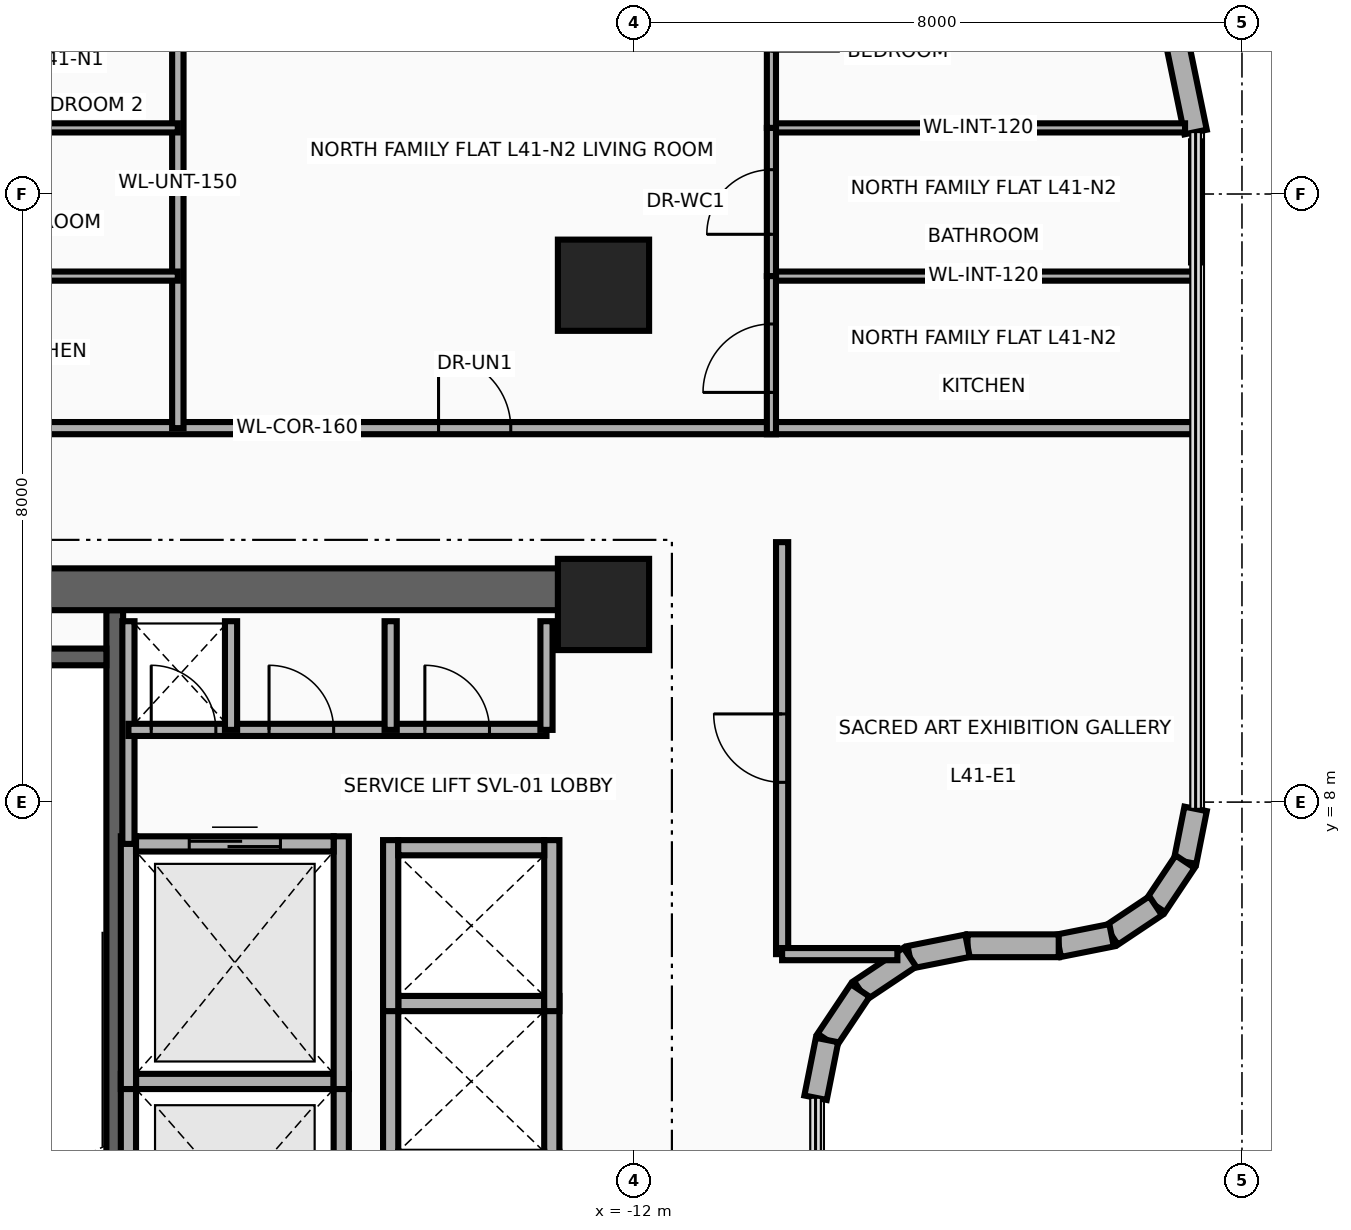
"""IFC4 building model, lengths in metres.
Left out: names, types, materials, properties, quantities, classifications, styles, units other than length and angle.
Written with IfcOpenShell. Run it as: python <this file> out.ifc"""

import sys

from ifc_helpers import new_model, si_unit, direction, frame, frame_2d, origin, origin_2d, place, context, subcontext, project, spatial, rectangle, extrude, source, transform, mapped, element, fill, save


model = new_model("IFC4")
c1 = context("Model", 3, precision=1e-05, world=origin(), true_north=direction((0.0, 1.0)))
c2 = subcontext(c1, "Body", "Model", "MODEL_VIEW")
j1 = project(units=[si_unit("LENGTHUNIT", "METRE"), si_unit("PLANEANGLEUNIT", "RADIAN")], contexts=[c1])
p1 = place(None, origin())
s1 = spatial("IfcSite", under=j1, at=p1, CompositionType="ELEMENT")
p2 = place(p1, origin())
s2 = spatial("IfcBuilding", under=s1, at=p2, CompositionType="ELEMENT")
p3 = place(p2, frame((0.0, 0.0, 161.2)))
s3 = spatial("IfcBuildingStorey", under=s2, at=p3, CompositionType="ELEMENT", Elevation=161.2)
p4 = place(p3, frame((-18.83, 1.78, 0.0), z_axis=(0.0, 0.0, 1.0), x_axis=(0.0, 1.0, 0.0)))
e1 = element("IfcWall", 1, at=p4, inside=s3, PredefinedType="SHEAR", context=c2, shape_type="SweptSolid", body=[
    extrude(rectangle(XDim=8.745, YDim=0.22, at=frame_2d((4.373, 0.0))), origin(), (0.0, 0.0, 1.0), 3.46),
])
p5 = place(p3, frame((-22.05, 9.91, 0.0), z_axis=(0.0, 0.0, 1.0), x_axis=(1.0, 0.0, 0.0)))
e2 = element("IfcWall", 2, at=p5, inside=s3, PredefinedType="SHEAR", context=c2, shape_type="SweptSolid", body=[
    extrude(rectangle(XDim=3.11, YDim=0.22, at=frame_2d((1.555, 0.0))), origin(), (0.0, 0.0, 1.0), 3.46),
])
p6 = place(p3, frame((-22.65, 10.8, 0.0), z_axis=(0.0, 0.0, 1.0), x_axis=(1.0, 0.0, 0.0)))
e3 = element("IfcWall", 3, at=p6, inside=s3, PredefinedType="SHEAR", context=c2, shape_type="SweptSolid", body=[
    extrude(rectangle(XDim=10.25, YDim=0.55, at=frame_2d((5.125, 0.0))), origin(), (0.0, 0.0, 1.0), 3.46),
])
m1 = source(origin(), c2, "Body", "SweptSolid", [
    extrude(rectangle(XDim=1.2, YDim=1.2, at=origin_2d()), origin(), (0.0, 0.0, 1.0), 3.7),
])
for number, where, z_axis, x_axis in (
    (4, (-12.4, 10.6, 0.0), (0.0, 0.0, 1.0), (1.0, 0.0, 0.0)),
    (5, (-12.4, 14.8, 0.0), (0.0, 0.0, 1.0), (1.0, 0.0, 0.0)),
):
    element("IfcColumn", number, at=place(p3, frame(where, z_axis=z_axis, x_axis=x_axis)), inside=s3, PredefinedType="COLUMN", context=c2, shape_type="MappedRepresentation", body=[
        mapped(m1, transform((0.0, 0.0, 0.0), x_axis=(1.0, 0.0, 0.0), y_axis=(0.0, 1.0, 0.0), z_axis=(0.0, 0.0, 1.0), scale=1.0)),
    ])
p7 = place(p3, frame((-4.863, 18.046, 0.0), z_axis=(0.0, 0.0, 1.0), x_axis=(0.201532282172, -0.97948187285, 0.0)))
e6 = element("IfcWall", 6, at=p7, inside=s3, PredefinedType="SOLIDWALL", context=c2, shape_type="SweptSolid", body=[
    extrude(rectangle(XDim=1.256, YDim=0.3, at=frame_2d((0.628, 0.0))), origin(), (0.0, 0.0, 1.0), 3.46),
])
p8 = place(p3, frame((-4.61, 7.911, 0.0), z_axis=(0.0, 0.0, 1.0), x_axis=(-0.194989739953, -0.980805282058, 0.0)))
e7 = element("IfcWall", 7, at=p8, inside=s3, PredefinedType="SOLIDWALL", context=c2, shape_type="SweptSolid", body=[
    extrude(rectangle(XDim=0.709, YDim=0.3, at=frame_2d((0.354, 0.0))), origin(), (0.0, 0.0, 1.0), 3.46),
])
for number, where, z_axis, x_axis in (
    (8, (-4.748, 7.216, 0.0), (0.0, 0.0, 1.0), (-0.555, -0.832, 0.0)),
    (9, (-5.136, 6.636, 0.0), (0.0, 0.0, 1.0), (-0.832, -0.555, 0.0)),
):
    element("IfcWall", number, at=place(p3, frame(where, z_axis=z_axis, x_axis=x_axis)), inside=s3, PredefinedType="SOLIDWALL", context=c2, shape_type="SweptSolid", body=[
        extrude(rectangle(XDim=0.698, YDim=0.3, at=frame_2d((0.349, 0.0))), origin(), (0.0, 0.0, 1.0), 3.46),
    ])
p9 = place(p3, frame((-5.716, 6.248, 0.0), z_axis=(0.0, 0.0, 1.0), x_axis=(-0.980805282058, -0.194989739953, 0.0)))
e10 = element("IfcWall", 10, at=p9, inside=s3, PredefinedType="SOLIDWALL", context=c2, shape_type="SweptSolid", body=[
    extrude(rectangle(XDim=0.709, YDim=0.3, at=frame_2d((0.354, 0.0))), origin(), (0.0, 0.0, 1.0), 3.46),
])
p10 = place(p3, frame((-6.411, 6.11, 0.0), z_axis=(0.0, 0.0, 1.0), x_axis=(-1.0, 0.0, 0.0)))
e11 = element("IfcWall", 11, at=p10, inside=s3, PredefinedType="SOLIDWALL", context=c2, shape_type="SweptSolid", body=[
    extrude(rectangle(XDim=1.2, YDim=0.3, at=frame_2d((0.6, 0.0))), origin(), (0.0, 0.0, 1.0), 3.46),
])
p11 = place(p3, frame((-7.611, 6.11, 0.0), z_axis=(0.0, 0.0, 1.0), x_axis=(-0.98076219082, -0.195206365311, 0.0)))
e12 = element("IfcWall", 12, at=p11, inside=s3, PredefinedType="SOLIDWALL", context=c2, shape_type="SweptSolid", body=[
    extrude(rectangle(XDim=0.774, YDim=0.3, at=frame_2d((0.387, 0.0))), origin(), (0.0, 0.0, 1.0), 3.46),
])
for number, where, z_axis, x_axis in (
    (13, (-8.37, 5.959, 0.0), (0.0, 0.0, 1.0), (-0.831, -0.556, 0.0)),
    (14, (-9.023, 5.523, 0.0), (0.0, 0.0, 1.0), (-0.556, -0.831, 0.0)),
):
    element("IfcWall", number, at=place(p3, frame(where, z_axis=z_axis, x_axis=x_axis)), inside=s3, PredefinedType="SOLIDWALL", context=c2, shape_type="SweptSolid", body=[
        extrude(rectangle(XDim=0.785, YDim=0.3, at=frame_2d((0.393, 0.0))), origin(), (0.0, 0.0, 1.0), 3.46),
    ])
p12 = place(p3, frame((-9.459, 4.87, 0.0), z_axis=(0.0, 0.0, 1.0), x_axis=(-0.195206365311, -0.98076219082, 0.0)))
e15 = element("IfcWall", 15, at=p12, inside=s3, PredefinedType="SOLIDWALL", context=c2, shape_type="SweptSolid", body=[
    extrude(rectangle(XDim=0.774, YDim=0.3, at=frame_2d((0.387, 0.0))), origin(), (0.0, 0.0, 1.0), 3.46),
])
for number, where, z_axis, x_axis in (
    (16, (-18.65, 1.2, 0.0), (0.0, 0.0, 1.0), (0.0, 1.0, 0.0)),
    (17, (-15.85, 1.2, 0.0), (0.0, 0.0, 1.0), (0.0, 1.0, 0.0)),
):
    element("IfcWall", number, at=place(p3, frame(where, z_axis=z_axis, x_axis=x_axis)), inside=s3, PredefinedType="MOVABLE", context=c2, shape_type="SweptSolid", body=[
        extrude(rectangle(XDim=3.225, YDim=0.2, at=frame_2d((1.613, 0.0))), origin(), (0.0, 0.0, 1.0), 3.46),
    ])
p13 = place(p3, frame((-18.55, 4.325, 0.0), z_axis=(0.0, 0.0, 1.0), x_axis=(1.0, 0.0, 0.0)))
e18 = element("IfcWall", 18, at=p13, inside=s3, PredefinedType="MOVABLE", context=c2, shape_type="SweptSolid", body=[
    extrude(rectangle(XDim=2.6, YDim=0.2, at=frame_2d((1.3, 0.0))), origin(), (0.0, 0.0, 1.0), 3.46),
])
for number, where, z_axis, x_axis in (
    (19, (-18.65, 4.225, 0.0), (0.0, 0.0, 1.0), (0.0, 1.0, 0.0)),
    (20, (-15.85, 4.225, 0.0), (0.0, 0.0, 1.0), (0.0, 1.0, 0.0)),
):
    element("IfcWall", number, at=place(p3, frame(where, z_axis=z_axis, x_axis=x_axis)), inside=s3, PredefinedType="MOVABLE", context=c2, shape_type="SweptSolid", body=[
        extrude(rectangle(XDim=3.325, YDim=0.2, at=frame_2d((1.663, 0.0))), origin(), (0.0, 0.0, 1.0), 3.46),
    ])
p14 = place(p3, frame((-18.55, 7.45, 0.0), z_axis=(0.0, 0.0, 1.0), x_axis=(1.0, 0.0, 0.0)))
e21 = element("IfcWall", 21, at=p14, inside=s3, PredefinedType="MOVABLE", context=c2, shape_type="SweptSolid", body=[
    extrude(rectangle(XDim=2.6, YDim=0.2, at=frame_2d((1.3, 0.0))), origin(), (0.0, 0.0, 1.0), 3.46),
])
p15 = place(p14, frame((0.7, 0.0, 0.0)))
e22 = element("IfcOpeningElement", 22, at=p15, cuts=e21, PredefinedType="OPENING", context=c2, shape_type="SweptSolid", body=[
    extrude(rectangle(XDim=1.2, YDim=2.1, at=frame_2d((0.6, 1.05))), frame((0.0, 0.115, 0.0), z_axis=(0.0, -1.0, 0.0), x_axis=(1.0, 0.0, 0.0)), (0.0, 0.0, 1.0), 0.23),
])
for number, where, z_axis, x_axis in (
    (23, (-15.2, 3.2, 0.0), (0.0, 0.0, 1.0), (0.0, 1.0, 0.0)),
    (24, (-13.08, 3.2, 0.0), (0.0, 0.0, 1.0), (0.0, 1.0, 0.0)),
):
    element("IfcWall", number, at=place(p3, frame(where, z_axis=z_axis, x_axis=x_axis)), inside=s3, PredefinedType="MOVABLE", context=c2, shape_type="SweptSolid", body=[
        extrude(rectangle(XDim=2.25, YDim=0.2, at=frame_2d((1.125, 0.0))), origin(), (0.0, 0.0, 1.0), 3.46),
    ])
p16 = place(p3, frame((-15.1, 5.35, 0.0), z_axis=(0.0, 0.0, 1.0), x_axis=(1.0, 0.0, 0.0)))
e25 = element("IfcWall", 25, at=p16, inside=s3, PredefinedType="MOVABLE", context=c2, shape_type="SweptSolid", body=[
    extrude(rectangle(XDim=1.92, YDim=0.2, at=frame_2d((0.96, 0.0))), origin(), (0.0, 0.0, 1.0), 3.46),
])
for number, where, z_axis, x_axis in (
    (26, (-15.2, 5.25, 0.0), (0.0, 0.0, 1.0), (0.0, 1.0, 0.0)),
    (27, (-13.08, 5.25, 0.0), (0.0, 0.0, 1.0), (0.0, 1.0, 0.0)),
):
    element("IfcWall", number, at=place(p3, frame(where, z_axis=z_axis, x_axis=x_axis)), inside=s3, PredefinedType="MOVABLE", context=c2, shape_type="SweptSolid", body=[
        extrude(rectangle(XDim=2.25, YDim=0.2, at=frame_2d((1.125, 0.0))), origin(), (0.0, 0.0, 1.0), 3.46),
    ])
p17 = place(p3, frame((-15.1, 7.4, 0.0), z_axis=(0.0, 0.0, 1.0), x_axis=(1.0, 0.0, 0.0)))
e28 = element("IfcWall", 28, at=p17, inside=s3, PredefinedType="MOVABLE", context=c2, shape_type="SweptSolid", body=[
    extrude(rectangle(XDim=1.92, YDim=0.2, at=frame_2d((0.96, 0.0))), origin(), (0.0, 0.0, 1.0), 3.46),
])
p18 = place(p3, frame((-18.65, 7.45, 0.0), z_axis=(0.0, 0.0, 1.0), x_axis=(0.0, 1.0, 0.0)))
e29 = element("IfcWall", 29, at=p18, inside=s3, PredefinedType="PARTITIONING", context=c2, shape_type="SweptSolid", body=[
    extrude(rectangle(XDim=2.93, YDim=0.16, at=frame_2d((1.465, 0.0))), origin(), (0.0, 0.0, 1.0), 3.46),
])
p19 = place(p3, frame((-18.65, 8.95, 0.0), z_axis=(0.0, 0.0, 1.0), x_axis=(1.0, 0.0, 0.0)))
e30 = element("IfcWall", 30, at=p19, inside=s3, PredefinedType="PARTITIONING", context=c2, shape_type="SweptSolid", body=[
    extrude(rectangle(XDim=5.5, YDim=0.16, at=frame_2d((2.75, 0.0))), origin(), (0.0, 0.0, 1.0), 3.46),
])
p20 = place(p19, frame((0.3, 0.0, 0.0)))
e31 = element("IfcOpeningElement", 31, at=p20, cuts=e30, PredefinedType="OPENING", context=c2, shape_type="SweptSolid", body=[
    extrude(rectangle(XDim=0.85, YDim=2.05, at=frame_2d((0.425, 1.025))), frame((0.0, 0.095, 0.0), z_axis=(0.0, -1.0, 0.0), x_axis=(1.0, 0.0, 0.0)), (0.0, 0.0, 1.0), 0.19),
])
p21 = place(p19, frame((1.85, 0.0, 0.0)))
e32 = element("IfcOpeningElement", 32, at=p21, cuts=e30, PredefinedType="OPENING", context=c2, shape_type="SweptSolid", body=[
    extrude(rectangle(XDim=0.85, YDim=2.05, at=frame_2d((0.425, 1.025))), frame((0.0, 0.095, 0.0), z_axis=(0.0, -1.0, 0.0), x_axis=(1.0, 0.0, 0.0)), (0.0, 0.0, 1.0), 0.19),
])
p22 = place(p19, frame((3.9, 0.0, 0.0)))
e33 = element("IfcOpeningElement", 33, at=p22, cuts=e30, PredefinedType="OPENING", context=c2, shape_type="SweptSolid", body=[
    extrude(rectangle(XDim=0.85, YDim=2.05, at=frame_2d((0.425, 1.025))), frame((0.0, 0.095, 0.0), z_axis=(0.0, -1.0, 0.0), x_axis=(1.0, 0.0, 0.0)), (0.0, 0.0, 1.0), 0.19),
])
for number, where, z_axis, x_axis in (
    (34, (-13.15, 8.95, 0.0), (0.0, 0.0, 1.0), (0.0, 1.0, 0.0)),
    (35, (-17.3, 8.95, 0.0), (0.0, 0.0, 1.0), (0.0, 1.0, 0.0)),
    (36, (-15.2, 8.95, 0.0), (0.0, 0.0, 1.0), (0.0, 1.0, 0.0)),
):
    element("IfcWall", number, at=place(p3, frame(where, z_axis=z_axis, x_axis=x_axis)), inside=s3, PredefinedType="PARTITIONING", context=c2, shape_type="SweptSolid", body=[
        extrude(rectangle(XDim=1.43, YDim=0.16, at=frame_2d((0.715, 0.0))), origin(), (0.0, 0.0, 1.0), 3.46),
    ])
p23 = place(p3, frame((-28.25, 12.92, 0.0), z_axis=(0.0, 0.0, 1.0), x_axis=(1.0, 0.0, 0.0)))
e37 = element("IfcWall", 37, at=p23, inside=s3, PredefinedType="PARTITIONING", context=c2, shape_type="SweptSolid", body=[
    extrude(rectangle(XDim=23.64, YDim=0.16, at=frame_2d((11.82, 0.0))), origin(), (0.0, 0.0, 1.0), 2.834),
])
p24 = place(p23, frame((1.107, 0.0, 0.0)))
e38 = element("IfcOpeningElement", 38, at=p24, cuts=e37, PredefinedType="OPENING", context=c2, shape_type="SweptSolid", body=[
    extrude(rectangle(XDim=0.95, YDim=2.15, at=frame_2d((0.475, 1.075))), frame((0.0, 0.095, 0.0), z_axis=(0.0, -1.0, 0.0), x_axis=(1.0, 0.0, 0.0)), (0.0, 0.0, 1.0), 0.19),
])
p25 = place(p23, frame((13.68, 0.0, 0.0)))
e39 = element("IfcOpeningElement", 39, at=p25, cuts=e37, PredefinedType="OPENING", context=c2, shape_type="SweptSolid", body=[
    extrude(rectangle(XDim=0.95, YDim=2.15, at=frame_2d((0.475, 1.075))), frame((0.0, 0.095, 0.0), z_axis=(0.0, -1.0, 0.0), x_axis=(1.0, 0.0, 0.0)), (0.0, 0.0, 1.0), 0.19),
])
p26 = place(p3, frame((-18.0, 12.92, 0.0), z_axis=(0.0, 0.0, 1.0), x_axis=(0.0, 1.0, 0.0)))
e40 = element("IfcWall", 40, at=p26, inside=s3, PredefinedType="PARTITIONING", context=c2, shape_type="SweptSolid", body=[
    extrude(rectangle(XDim=6.457, YDim=0.15, at=frame_2d((3.229, 0.0))), origin(), (0.0, 0.0, 1.0), 2.666),
])
p27 = place(p3, frame((-25.085, 14.92, 0.0), z_axis=(0.0, 0.0, 1.0), x_axis=(1.0, 0.0, 0.0)))
e41 = element("IfcWall", 41, at=p27, inside=s3, PredefinedType="PARTITIONING", context=c2, shape_type="SweptSolid", body=[
    extrude(rectangle(XDim=7.085, YDim=0.12, at=frame_2d((3.542, 0.0))), origin(), (0.0, 0.0, 1.0), 2.666),
])
p28 = place(p3, frame((-25.085, 16.87, 0.0), z_axis=(0.0, 0.0, 1.0), x_axis=(1.0, 0.0, 0.0)))
e42 = element("IfcWall", 42, at=p28, inside=s3, PredefinedType="PARTITIONING", context=c2, shape_type="SweptSolid", body=[
    extrude(rectangle(XDim=7.085, YDim=0.12, at=frame_2d((3.542, 0.0))), origin(), (0.0, 0.0, 1.0), 3.46),
])
p29 = place(p3, frame((-10.191, 14.92, 0.0), z_axis=(0.0, 0.0, 1.0), x_axis=(1.0, 0.0, 0.0)))
e43 = element("IfcWall", 43, at=p29, inside=s3, PredefinedType="PARTITIONING", context=c2, shape_type="SweptSolid", body=[
    extrude(rectangle(XDim=5.581, YDim=0.12, at=frame_2d((2.79, 0.0))), origin(), (0.0, 0.0, 1.0), 3.46),
])
p30 = place(p3, frame((-10.191, 16.87, 0.0), z_axis=(0.0, 0.0, 1.0), x_axis=(1.0, 0.0, 0.0)))
e44 = element("IfcWall", 44, at=p30, inside=s3, PredefinedType="PARTITIONING", context=c2, shape_type="SweptSolid", body=[
    extrude(rectangle(XDim=5.442, YDim=0.12, at=frame_2d((2.721, 0.0))), origin(), (0.0, 0.0, 1.0), 3.46),
])
p31 = place(p3, frame((-10.191, 14.92, 0.0), z_axis=(0.0, 0.0, 1.0), x_axis=(0.0, 1.0, 0.0)))
e45 = element("IfcWall", 45, at=p31, inside=s3, PredefinedType="PARTITIONING", context=c2, shape_type="SweptSolid", body=[
    extrude(rectangle(XDim=1.95, YDim=0.12, at=frame_2d((0.975, 0.0))), origin(), (0.0, 0.0, 1.0), 3.46),
])
p32 = place(p31, frame((0.55, 0.0, 0.0)))
e46 = element("IfcOpeningElement", 46, at=p32, cuts=e45, PredefinedType="OPENING", context=c2, shape_type="SweptSolid", body=[
    extrude(rectangle(XDim=0.85, YDim=2.1, at=frame_2d((0.425, 1.05))), frame((0.0, 0.075, 0.0), z_axis=(0.0, -1.0, 0.0), x_axis=(1.0, 0.0, 0.0)), (0.0, 0.0, 1.0), 0.15),
])
p33 = place(p3, frame((-10.191, 12.84, 0.0), z_axis=(0.0, 0.0, 1.0), x_axis=(0.0, 1.0, 0.0)))
e47 = element("IfcWall", 47, at=p33, inside=s3, PredefinedType="PARTITIONING", context=c2, shape_type="SweptSolid", body=[
    extrude(rectangle(XDim=2.08, YDim=0.12, at=frame_2d((1.04, 0.0))), origin(), (0.0, 0.0, 1.0), 3.46),
])
p34 = place(p33, frame((0.55, 0.0, 0.0)))
e48 = element("IfcOpeningElement", 48, at=p34, cuts=e47, PredefinedType="OPENING", context=c2, shape_type="SweptSolid", body=[
    extrude(rectangle(XDim=0.9, YDim=2.1, at=frame_2d((0.45, 1.05))), frame((0.0, 0.075, 0.0), z_axis=(0.0, -1.0, 0.0), x_axis=(1.0, 0.0, 0.0)), (0.0, 0.0, 1.0), 0.15),
])
p35 = place(p3, frame((-10.191, 16.87, 0.0), z_axis=(0.0, 0.0, 1.0), x_axis=(0.0, 1.0, 0.0)))
e49 = element("IfcWall", 49, at=p35, inside=s3, PredefinedType="PARTITIONING", context=c2, shape_type="SweptSolid", body=[
    extrude(rectangle(XDim=2.919, YDim=0.12, at=frame_2d((1.459, 0.0))), origin(), (0.0, 0.0, 1.0), 3.46),
])
p36 = place(p35, frame((1.01, 0.0, 0.0)))
e50 = element("IfcOpeningElement", 50, at=p36, cuts=e49, PredefinedType="OPENING", context=c2, shape_type="SweptSolid", body=[
    extrude(rectangle(XDim=0.9, YDim=2.1, at=frame_2d((0.45, 1.05))), frame((0.0, 0.075, 0.0), z_axis=(0.0, -1.0, 0.0), x_axis=(1.0, 0.0, 0.0)), (0.0, 0.0, 1.0), 0.15),
])
p37 = place(p3, frame((-4.61, 15.1, 0.0), z_axis=(0.0, 0.0, 1.0), x_axis=(0.0, 1.0, 0.0)))
e51 = element("IfcWall", 51, at=p37, inside=s3, PredefinedType="PARTITIONING", context=c2, shape_type="SweptSolid", body=[
    extrude(rectangle(XDim=1.593, YDim=0.12, at=frame_2d((0.796, 0.0))), origin(), (0.0, 0.0, 1.0), 3.46),
])
p38 = place(p3, frame((-10.05, 6.0, 0.0), z_axis=(0.0, 0.0, 1.0), x_axis=(0.0, 1.0, 0.0)))
e52 = element("IfcWall", 52, at=p38, inside=s3, PredefinedType="PARTITIONING", context=c2, shape_type="SweptSolid", body=[
    extrude(rectangle(XDim=5.42, YDim=0.16, at=frame_2d((2.71, 0.0))), origin(), (0.0, 0.0, 1.0), 3.46),
])
p39 = place(p38, frame((2.26, 0.0, 0.0)))
e53 = element("IfcOpeningElement", 53, at=p39, cuts=e52, PredefinedType="OPENING", context=c2, shape_type="SweptSolid", body=[
    extrude(rectangle(XDim=0.9, YDim=2.1, at=frame_2d((0.45, 1.05))), frame((0.0, 0.095, 0.0), z_axis=(0.0, -1.0, 0.0), x_axis=(1.0, 0.0, 0.0)), (0.0, 0.0, 1.0), 0.19),
])
p40 = place(p3, frame((-10.05, 6.0, 0.0), z_axis=(0.0, 0.0, 1.0), x_axis=(1.0, 0.0, 0.0)))
e54 = element("IfcWall", 54, at=p40, inside=s3, PredefinedType="PARTITIONING", context=c2, shape_type="SweptSolid", body=[
    extrude(rectangle(XDim=1.516, YDim=0.16, at=frame_2d((0.758, 0.0))), origin(), (0.0, 0.0, 1.0), 3.46),
])
p41 = place(p15, origin())
e55 = element("IfcDoor", 55, at=p41, inside=s3, OperationType="DOUBLE_DOOR_SLIDING", PredefinedType="DOOR", context=c2, shape_type="SweptSolid", body=[
    extrude(rectangle(XDim=1.2, YDim=2.1, at=frame_2d((0.6, 1.05))), frame((0.0, 0.025, 0.0), z_axis=(0.0, -1.0, 0.0), x_axis=(1.0, 0.0, 0.0)), (0.0, 0.0, 1.0), 0.05),
])
fill(e22, e55)
p42 = place(p20, origin())
e56 = element("IfcDoor", 56, at=p42, inside=s3, OperationType="SINGLE_SWING_LEFT", PredefinedType="DOOR", context=c2, shape_type="SweptSolid", body=[
    extrude(rectangle(XDim=0.85, YDim=2.05, at=frame_2d((0.425, 1.025))), frame((0.0, 0.025, 0.0), z_axis=(0.0, -1.0, 0.0), x_axis=(1.0, 0.0, 0.0)), (0.0, 0.0, 1.0), 0.05),
])
fill(e31, e56)
p43 = place(p21, origin())
e57 = element("IfcDoor", 57, at=p43, inside=s3, OperationType="SINGLE_SWING_RIGHT", PredefinedType="DOOR", context=c2, shape_type="SweptSolid", body=[
    extrude(rectangle(XDim=0.85, YDim=2.05, at=frame_2d((0.425, 1.025))), frame((0.0, 0.025, 0.0), z_axis=(0.0, -1.0, 0.0), x_axis=(1.0, 0.0, 0.0)), (0.0, 0.0, 1.0), 0.05),
])
fill(e32, e57)
p44 = place(p22, origin())
e58 = element("IfcDoor", 58, at=p44, inside=s3, OperationType="SINGLE_SWING_LEFT", PredefinedType="DOOR", context=c2, shape_type="SweptSolid", body=[
    extrude(rectangle(XDim=0.85, YDim=2.05, at=frame_2d((0.425, 1.025))), frame((0.0, 0.025, 0.0), z_axis=(0.0, -1.0, 0.0), x_axis=(1.0, 0.0, 0.0)), (0.0, 0.0, 1.0), 0.05),
])
fill(e33, e58)
p45 = place(p25, origin())
e59 = element("IfcDoor", 59, at=p45, inside=s3, OperationType="SINGLE_SWING_RIGHT", PredefinedType="DOOR", context=c2, shape_type="SweptSolid", body=[
    extrude(rectangle(XDim=0.95, YDim=2.15, at=frame_2d((0.475, 1.075))), frame((0.0, 0.025, 0.0), z_axis=(0.0, -1.0, 0.0), x_axis=(1.0, 0.0, 0.0)), (0.0, 0.0, 1.0), 0.05),
])
fill(e39, e59)
p46 = place(p32, origin())
e60 = element("IfcDoor", 60, at=p46, inside=s3, OperationType="SINGLE_SWING_LEFT", PredefinedType="DOOR", context=c2, shape_type="SweptSolid", body=[
    extrude(rectangle(XDim=0.85, YDim=2.1, at=frame_2d((0.425, 1.05))), frame((0.0, 0.025, 0.0), z_axis=(0.0, -1.0, 0.0), x_axis=(1.0, 0.0, 0.0)), (0.0, 0.0, 1.0), 0.05),
])
fill(e46, e60)
p47 = place(p34, origin())
e61 = element("IfcDoor", 61, at=p47, inside=s3, OperationType="SINGLE_SWING_RIGHT", PredefinedType="DOOR", context=c2, shape_type="SweptSolid", body=[
    extrude(rectangle(XDim=0.9, YDim=2.1, at=frame_2d((0.45, 1.05))), frame((0.0, 0.025, 0.0), z_axis=(0.0, -1.0, 0.0), x_axis=(1.0, 0.0, 0.0)), (0.0, 0.0, 1.0), 0.05),
])
fill(e48, e61)
p48 = place(p39, origin())
e62 = element("IfcDoor", 62, at=p48, inside=s3, OperationType="SINGLE_SWING_RIGHT", PredefinedType="DOOR", context=c2, shape_type="SweptSolid", body=[
    extrude(rectangle(XDim=0.9, YDim=2.1, at=frame_2d((0.45, 1.05))), frame((0.0, 0.025, 0.0), z_axis=(0.0, -1.0, 0.0), x_axis=(1.0, 0.0, 0.0)), (0.0, 0.0, 1.0), 0.05),
])
fill(e53, e62)
save(model, sys.argv[1])
